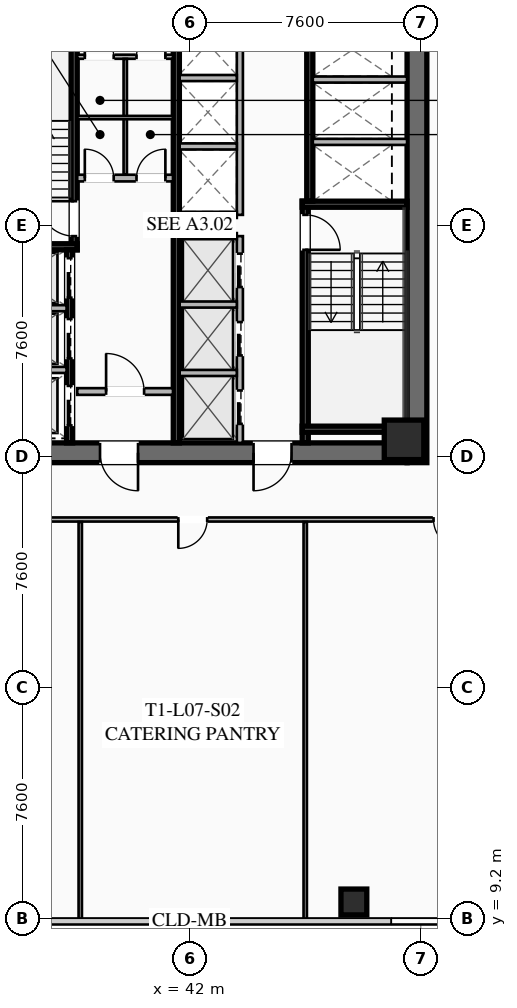
"""IFC4 building model, lengths in metres.
Left out: names, types, materials, properties, quantities, classifications, styles, units other than length and angle.
Written with IfcOpenShell. Run it as: python <this file> out.ifc"""

import sys

from ifc_helpers import new_model, si_unit, direction, frame, frame_2d, origin, origin_2d, place, context, subcontext, project, spatial, rectangle, hollow_rectangle, extrude, element, fill, save


model = new_model("IFC4")
c1 = context("Model", 3, precision=1e-05, world=origin(), true_north=direction((0.0, 1.0)))
c2 = subcontext(c1, "Body", "Model", "MODEL_VIEW")
j1 = project(units=[si_unit("LENGTHUNIT", "METRE"), si_unit("PLANEANGLEUNIT", "RADIAN")], contexts=[c1])
p1 = place(None, origin())
s1 = spatial("IfcSite", under=j1, at=p1, CompositionType="ELEMENT")
p2 = place(p1, origin())
s2 = spatial("IfcBuilding", under=s1, at=p2, CompositionType="ELEMENT")
p3 = place(p2, frame((0.0, 0.0, 31.7)))
s3 = spatial("IfcBuildingStorey", under=s2, at=p3, CompositionType="ELEMENT", Elevation=31.7)
p4 = place(p3, frame((49.475, 39.8, 0.0), z_axis=(0.0, 0.0, 1.0), x_axis=(0.0, -1.0, 0.0)))
e1 = element("IfcWall", 1, at=p4, inside=s3, PredefinedType="SHEAR", context=c2, shape_type="SweptSolid", body=[
    extrude(rectangle(XDim=15.6, YDim=0.65, at=frame_2d((7.8, 0.0))), origin(), (0.0, 0.0, 1.0), 3.55),
])
p5 = place(p3, frame((49.15, 24.525, 0.0), z_axis=(0.0, 0.0, 1.0), x_axis=(-1.0, 0.0, 0.0)))
e2 = element("IfcWall", 2, at=p5, inside=s3, PredefinedType="SHEAR", context=c2, shape_type="SweptSolid", body=[
    extrude(rectangle(XDim=14.3, YDim=0.65, at=frame_2d((7.15, 0.0))), origin(), (0.0, 0.0, 1.0), 3.55),
])
p6 = place(p5, frame((8.85, 0.0, 0.0)))
e3 = element("IfcOpeningElement", 3, at=p6, cuts=e2, PredefinedType="OPENING", context=c2, shape_type="SweptSolid", body=[
    extrude(rectangle(XDim=1.25, YDim=2.25, at=frame_2d((0.625, 1.125))), frame((0.0, 0.335, 0.0), z_axis=(0.0, -1.0, 0.0), x_axis=(1.0, 0.0, 0.0)), (0.0, 0.0, 1.0), 0.67),
])
p7 = place(p5, frame((3.8, 0.0, 0.0)))
e4 = element("IfcOpeningElement", 4, at=p7, cuts=e2, PredefinedType="OPENING", context=c2, shape_type="SweptSolid", body=[
    extrude(rectangle(XDim=1.25, YDim=2.25, at=frame_2d((0.625, 1.125))), frame((0.0, 0.335, 0.0), z_axis=(0.0, -1.0, 0.0), x_axis=(1.0, 0.0, 0.0)), (0.0, 0.0, 1.0), 0.67),
])
p8 = place(p3, frame((49.05, 24.95, 0.0), z_axis=(0.0, 0.0, 1.0), x_axis=(1.0, 0.0, 0.0)))
e5 = element("IfcColumn", 5, at=p8, inside=s3, PredefinedType="COLUMN", context=c2, shape_type="SweptSolid", body=[
    extrude(hollow_rectangle(XDim=1.3, YDim=1.3, WallThickness=0.05, at=origin_2d()), origin(), (0.0, 0.0, 1.0), 3.35),
])
p9 = place(p3, frame((47.4, 9.75, 0.0), z_axis=(0.0, 0.0, 1.0), x_axis=(1.0, 0.0, 0.0)))
e6 = element("IfcColumn", 6, at=p9, inside=s3, PredefinedType="COLUMN", context=c2, shape_type="SweptSolid", body=[
    extrude(hollow_rectangle(XDim=0.85, YDim=0.85, WallThickness=0.035, at=origin_2d()), origin(), (0.0, 0.0, 1.0), 3.35),
])
p10 = place(p3, frame((38.2, 31.2, 0.0), z_axis=(0.0, 0.0, 1.0), x_axis=(0.0, 1.0, 0.0)))
e7 = element("IfcWall", 7, at=p10, inside=s3, PredefinedType="SHEAR", context=c2, shape_type="SweptSolid", body=[
    extrude(rectangle(XDim=7.95, YDim=0.2, at=frame_2d((3.975, 0.0))), origin(), (0.0, 0.0, 1.0), 3.35),
])
p11 = place(p10, frame((0.45, 0.0, 0.0)))
e8 = element("IfcOpeningElement", 8, at=p11, cuts=e7, PredefinedType="OPENING", context=c2, shape_type="SweptSolid", body=[
    extrude(rectangle(XDim=1.15, YDim=2.2, at=frame_2d((0.575, 1.1))), frame((0.0, 0.11, 0.0), z_axis=(0.0, -1.0, 0.0), x_axis=(1.0, 0.0, 0.0)), (0.0, 0.0, 1.0), 0.22),
])
p12 = place(p3, frame((34.85, 31.3, 0.0), z_axis=(0.0, 0.0, 1.0), x_axis=(1.0, 0.0, 0.0)))
e9 = element("IfcWall", 9, at=p12, inside=s3, PredefinedType="SHEAR", context=c2, shape_type="SweptSolid", body=[
    extrude(rectangle(XDim=3.45, YDim=0.2, at=frame_2d((1.725, 0.0))), origin(), (0.0, 0.0, 1.0), 3.35),
])
p13 = place(p3, frame((45.8, 32.8, 0.0), z_axis=(0.0, 0.0, 1.0), x_axis=(0.0, -1.0, 0.0)))
e10 = element("IfcWall", 10, at=p13, inside=s3, PredefinedType="SHEAR", context=c2, shape_type="SweptSolid", body=[
    extrude(rectangle(XDim=7.95, YDim=0.2, at=frame_2d((3.975, 0.0))), origin(), (0.0, 0.0, 1.0), 3.35),
])
p14 = place(p13, frame((0.45, 0.0, 0.0)))
e11 = element("IfcOpeningElement", 11, at=p14, cuts=e10, PredefinedType="OPENING", context=c2, shape_type="SweptSolid", body=[
    extrude(rectangle(XDim=1.15, YDim=2.2, at=frame_2d((0.575, 1.1))), frame((0.0, 0.11, 0.0), z_axis=(0.0, -1.0, 0.0), x_axis=(1.0, 0.0, 0.0)), (0.0, 0.0, 1.0), 0.22),
])
for number, where, z_axis, x_axis in (
    (12, (45.7, 32.7, 0.0), (0.0, 0.0, 1.0), (1.0, 0.0, 0.0)),
    (13, (45.7, 25.3, 0.0), (0.0, 0.0, 1.0), (1.0, 0.0, 0.0)),
):
    element("IfcWall", number, at=place(p3, frame(where, z_axis=z_axis, x_axis=x_axis)), inside=s3, PredefinedType="SHEAR", context=c2, shape_type="SweptSolid", body=[
        extrude(rectangle(XDim=3.45, YDim=0.2, at=frame_2d((1.725, 0.0))), origin(), (0.0, 0.0, 1.0), 3.35),
    ])
p15 = place(p3, frame((41.56, 24.85, 0.0), z_axis=(0.0, 0.0, 1.0), x_axis=(0.0, 1.0, 0.0)))
e14 = element("IfcWall", 14, at=p15, inside=s3, PredefinedType="SHEAR", context=c2, shape_type="SweptSolid", body=[
    extrude(rectangle(XDim=14.3, YDim=0.2, at=frame_2d((7.15, 0.0))), origin(), (0.0, 0.0, 1.0), 3.35),
])
p16 = place(p3, frame((38.3, 33.56, 0.0), z_axis=(0.0, 0.0, 1.0), x_axis=(1.0, 0.0, 0.0)))
e15 = element("IfcWall", 15, at=p16, inside=s3, PredefinedType="SOLIDWALL", context=c2, shape_type="SweptSolid", body=[
    extrude(rectangle(XDim=3.15, YDim=0.22, at=frame_2d((1.575, 0.0))), origin(), (0.0, 0.0, 1.0), 2.703),
])
p17 = place(p16, frame((0.25, 0.0, 0.0)))
e16 = element("IfcOpeningElement", 16, at=p17, cuts=e15, PredefinedType="OPENING", context=c2, shape_type="SweptSolid", body=[
    extrude(rectangle(XDim=0.95, YDim=2.05, at=frame_2d((0.475, 1.025))), frame((0.0, 0.12, 0.0), z_axis=(0.0, -1.0, 0.0), x_axis=(1.0, 0.0, 0.0)), (0.0, 0.0, 1.0), 0.24),
])
p18 = place(p16, frame((1.95, 0.0, 0.0)))
e17 = element("IfcOpeningElement", 17, at=p18, cuts=e15, PredefinedType="OPENING", context=c2, shape_type="SweptSolid", body=[
    extrude(rectangle(XDim=0.95, YDim=2.05, at=frame_2d((0.475, 1.025))), frame((0.0, 0.12, 0.0), z_axis=(0.0, -1.0, 0.0), x_axis=(1.0, 0.0, 0.0)), (0.0, 0.0, 1.0), 0.24),
])
p19 = place(p3, frame((38.3, 26.54, 0.0), z_axis=(0.0, 0.0, 1.0), x_axis=(1.0, 0.0, 0.0)))
e18 = element("IfcWall", 18, at=p19, inside=s3, PredefinedType="SOLIDWALL", context=c2, shape_type="SweptSolid", body=[
    extrude(rectangle(XDim=3.15, YDim=0.22, at=frame_2d((1.575, 0.0))), origin(), (0.0, 0.0, 1.0), 2.703),
])
p20 = place(p19, frame((0.95, 0.0, 0.0)))
e19 = element("IfcOpeningElement", 19, at=p20, cuts=e18, PredefinedType="OPENING", context=c2, shape_type="SweptSolid", body=[
    extrude(rectangle(XDim=1.25, YDim=2.25, at=frame_2d((0.625, 1.125))), frame((0.0, 0.12, 0.0), z_axis=(0.0, -1.0, 0.0), x_axis=(1.0, 0.0, 0.0)), (0.0, 0.0, 1.0), 0.24),
])
p21 = place(p3, frame((38.05, 24.85, 0.0), z_axis=(0.0, 0.0, 1.0), x_axis=(0.0, 1.0, 0.0)))
e20 = element("IfcWall", 20, at=p21, inside=s3, PredefinedType="SHEAR", context=c2, shape_type="SweptSolid", body=[
    extrude(rectangle(XDim=6.35, YDim=0.2, at=frame_2d((3.175, 0.0))), origin(), (0.0, 0.0, 1.0), 3.35),
])
p22 = place(p21, frame((4.775, 0.0, 0.0)))
e21 = element("IfcOpeningElement", 21, at=p22, cuts=e20, PredefinedType="OPENING", context=c2, shape_type="SweptSolid", body=[
    extrude(rectangle(XDim=1.3, YDim=2.25, at=frame_2d((0.65, 1.125))), frame((0.0, 0.11, 0.0), z_axis=(0.0, -1.0, 0.0), x_axis=(1.0, 0.0, 0.0)), (0.0, 0.0, 1.0), 0.22),
])
p23 = place(p21, frame((2.775, 0.0, 0.0)))
e22 = element("IfcOpeningElement", 22, at=p23, cuts=e20, PredefinedType="OPENING", context=c2, shape_type="SweptSolid", body=[
    extrude(rectangle(XDim=1.3, YDim=2.25, at=frame_2d((0.65, 1.125))), frame((0.0, 0.11, 0.0), z_axis=(0.0, -1.0, 0.0), x_axis=(1.0, 0.0, 0.0)), (0.0, 0.0, 1.0), 0.22),
])
p24 = place(p21, frame((0.575, 0.0, 0.0)))
e23 = element("IfcOpeningElement", 23, at=p24, cuts=e20, PredefinedType="OPENING", context=c2, shape_type="SweptSolid", body=[
    extrude(rectangle(XDim=1.3, YDim=2.25, at=frame_2d((0.65, 1.125))), frame((0.0, 0.11, 0.0), z_axis=(0.0, -1.0, 0.0), x_axis=(1.0, 0.0, 0.0)), (0.0, 0.0, 1.0), 0.22),
])
for number, where, z_axis, x_axis in (
    (24, (34.85, 27.25, 0.0), (0.0, 0.0, 1.0), (1.0, 0.0, 0.0)),
    (25, (34.85, 29.28, 0.0), (0.0, 0.0, 1.0), (1.0, 0.0, 0.0)),
):
    element("IfcWall", number, at=place(p3, frame(where, z_axis=z_axis, x_axis=x_axis)), inside=s3, PredefinedType="SOLIDWALL", context=c2, shape_type="SweptSolid", body=[
        extrude(rectangle(XDim=3.1, YDim=0.2, at=frame_2d((1.55, 0.0))), origin(), (0.0, 0.0, 1.0), 3.35),
    ])
p25 = place(p3, frame((45.95, 39.15, 0.0), z_axis=(0.0, 0.0, 1.0), x_axis=(0.0, -1.0, 0.0)))
e26 = element("IfcWall", 26, at=p25, inside=s3, PredefinedType="SHEAR", context=c2, shape_type="SweptSolid", body=[
    extrude(rectangle(XDim=6.35, YDim=0.2, at=frame_2d((3.175, 0.0))), origin(), (0.0, 0.0, 1.0), 3.35),
])
for number, where, z_axis, x_axis in (
    (27, (46.05, 34.75, 0.0), (0.0, 0.0, 1.0), (1.0, 0.0, 0.0)),
    (28, (46.05, 36.8, 0.0), (0.0, 0.0, 1.0), (1.0, 0.0, 0.0)),
):
    element("IfcWall", number, at=place(p3, frame(where, z_axis=z_axis, x_axis=x_axis)), inside=s3, PredefinedType="SOLIDWALL", context=c2, shape_type="SweptSolid", body=[
        extrude(rectangle(XDim=3.1, YDim=0.2, at=frame_2d((1.55, 0.0))), origin(), (0.0, 0.0, 1.0), 3.35),
    ])
p26 = place(p3, frame((38.3, 37.55, 0.0), z_axis=(0.0, 0.0, 1.0), x_axis=(1.0, 0.0, 0.0)))
e29 = element("IfcWall", 29, at=p26, inside=s3, PredefinedType="PARTITIONING", context=c2, shape_type="SweptSolid", body=[
    extrude(rectangle(XDim=3.15, YDim=0.135, at=frame_2d((1.575, 0.0))), origin(), (0.0, 0.0, 1.0), 2.703),
])
p27 = place(p26, frame((0.25, 0.0, 0.0)))
e30 = element("IfcOpeningElement", 30, at=p27, cuts=e29, PredefinedType="OPENING", context=c2, shape_type="SweptSolid", body=[
    extrude(rectangle(XDim=0.95, YDim=2.05, at=frame_2d((0.475, 1.025))), frame((0.0, 0.077, 0.0), z_axis=(0.0, -1.0, 0.0), x_axis=(1.0, 0.0, 0.0)), (0.0, 0.0, 1.0), 0.155),
])
p28 = place(p26, frame((1.95, 0.0, 0.0)))
e31 = element("IfcOpeningElement", 31, at=p28, cuts=e29, PredefinedType="OPENING", context=c2, shape_type="SweptSolid", body=[
    extrude(rectangle(XDim=0.95, YDim=2.05, at=frame_2d((0.475, 1.025))), frame((0.0, 0.077, 0.0), z_axis=(0.0, -1.0, 0.0), x_axis=(1.0, 0.0, 0.0)), (0.0, 0.0, 1.0), 0.155),
])
p29 = place(p3, frame((39.88, 33.68, 0.0), z_axis=(0.0, 0.0, 1.0), x_axis=(0.0, 1.0, 0.0)))
e32 = element("IfcWall", 32, at=p29, inside=s3, PredefinedType="PARTITIONING", context=c2, shape_type="SweptSolid", body=[
    extrude(rectangle(XDim=3.8, YDim=0.11, at=frame_2d((1.9, 0.0))), origin(), (0.0, 0.0, 1.0), 2.703),
])
p30 = place(p3, frame((38.3, 35.55, 0.0), z_axis=(0.0, 0.0, 1.0), x_axis=(1.0, 0.0, 0.0)))
e33 = element("IfcWall", 33, at=p30, inside=s3, PredefinedType="PARTITIONING", context=c2, shape_type="SweptSolid", body=[
    extrude(rectangle(XDim=3.15, YDim=0.11, at=frame_2d((1.575, 0.0))), origin(), (0.0, 0.0, 1.0), 2.703),
])
p31 = place(p3, frame((43.65, 24.85, 0.0), z_axis=(0.0, 0.0, 1.0), x_axis=(0.0, 1.0, 0.0)))
e34 = element("IfcWall", 34, at=p31, inside=s3, PredefinedType="SOLIDWALL", context=c2, shape_type="SweptSolid", body=[
    extrude(rectangle(XDim=6.8, YDim=0.2, at=frame_2d((3.4, 0.0))), origin(), (0.0, 0.0, 1.0), 3.35),
])
p32 = place(p31, frame((0.625, 0.0, 0.0)))
e35 = element("IfcOpeningElement", 35, at=p32, cuts=e34, PredefinedType="OPENING", context=c2, shape_type="SweptSolid", body=[
    extrude(rectangle(XDim=1.1, YDim=2.2, at=frame_2d((0.55, 1.1))), frame((0.0, 0.11, 0.0), z_axis=(0.0, -1.0, 0.0), x_axis=(1.0, 0.0, 0.0)), (0.0, 0.0, 1.0), 0.22),
])
p33 = place(p31, frame((2.875, 0.0, 0.0)))
e36 = element("IfcOpeningElement", 36, at=p33, cuts=e34, PredefinedType="OPENING", context=c2, shape_type="SweptSolid", body=[
    extrude(rectangle(XDim=1.1, YDim=2.2, at=frame_2d((0.55, 1.1))), frame((0.0, 0.11, 0.0), z_axis=(0.0, -1.0, 0.0), x_axis=(1.0, 0.0, 0.0)), (0.0, 0.0, 1.0), 0.22),
])
p34 = place(p31, frame((5.125, 0.0, 0.0)))
e37 = element("IfcOpeningElement", 37, at=p34, cuts=e34, PredefinedType="OPENING", context=c2, shape_type="SweptSolid", body=[
    extrude(rectangle(XDim=1.1, YDim=2.2, at=frame_2d((0.55, 1.1))), frame((0.0, 0.11, 0.0), z_axis=(0.0, -1.0, 0.0), x_axis=(1.0, 0.0, 0.0)), (0.0, 0.0, 1.0), 0.22),
])
for number, where, z_axis, x_axis in (
    (38, (41.67, 27.15, 0.0), (0.0, 0.0, 1.0), (1.0, 0.0, 0.0)),
    (39, (41.67, 29.4, 0.0), (0.0, 0.0, 1.0), (1.0, 0.0, 0.0)),
    (40, (41.67, 31.65, 0.0), (0.0, 0.0, 1.0), (1.0, 0.0, 0.0)),
):
    element("IfcWall", number, at=place(p3, frame(where, z_axis=z_axis, x_axis=x_axis)), inside=s3, PredefinedType="SOLIDWALL", context=c2, shape_type="SweptSolid", body=[
        extrude(rectangle(XDim=1.88, YDim=0.2, at=frame_2d((0.94, 0.0))), origin(), (0.0, 0.0, 1.0), 3.35),
    ])
p35 = place(p3, frame((43.65, 32.35, 0.0), z_axis=(0.0, 0.0, 1.0), x_axis=(0.0, 1.0, 0.0)))
e41 = element("IfcWall", 41, at=p35, inside=s3, PredefinedType="SOLIDWALL", context=c2, shape_type="SweptSolid", body=[
    extrude(rectangle(XDim=6.8, YDim=0.2, at=frame_2d((3.4, 0.0))), origin(), (0.0, 0.0, 1.0), 3.35),
])
for number, where, z_axis, x_axis in (
    (42, (41.67, 32.35, 0.0), (0.0, 0.0, 1.0), (1.0, 0.0, 0.0)),
    (43, (41.67, 34.6, 0.0), (0.0, 0.0, 1.0), (1.0, 0.0, 0.0)),
    (44, (41.67, 36.85, 0.0), (0.0, 0.0, 1.0), (1.0, 0.0, 0.0)),
):
    element("IfcWall", number, at=place(p3, frame(where, z_axis=z_axis, x_axis=x_axis)), inside=s3, PredefinedType="SOLIDWALL", context=c2, shape_type="SweptSolid", body=[
        extrude(rectangle(XDim=1.88, YDim=0.2, at=frame_2d((0.94, 0.0))), origin(), (0.0, 0.0, 1.0), 3.35),
    ])
p36 = place(p3, frame((51.35, 22.33, 0.0), z_axis=(0.0, 0.0, 1.0), x_axis=(-1.0, 0.0, 0.0)))
e45 = element("IfcWall", 45, at=p36, inside=s3, PredefinedType="PARTITIONING", context=c2, shape_type="SweptSolid", body=[
    extrude(rectangle(XDim=29.0, YDim=0.135, at=frame_2d((14.5, 0.0))), origin(), (0.0, 0.0, 1.0), 2.703),
])
p37 = place(p36, frame((27.67, 0.0, 0.0)))
e46 = element("IfcOpeningElement", 46, at=p37, cuts=e45, PredefinedType="OPENING", context=c2, shape_type="SweptSolid", body=[
    extrude(rectangle(XDim=0.95, YDim=2.05, at=frame_2d((0.475, 1.025))), frame((0.0, 0.077, 0.0), z_axis=(0.0, -1.0, 0.0), x_axis=(1.0, 0.0, 0.0)), (0.0, 0.0, 1.0), 0.155),
])
p38 = place(p36, frame((8.775, 0.0, 0.0)))
e47 = element("IfcOpeningElement", 47, at=p38, cuts=e45, PredefinedType="OPENING", context=c2, shape_type="SweptSolid", body=[
    extrude(rectangle(XDim=0.95, YDim=2.05, at=frame_2d((0.475, 1.025))), frame((0.0, 0.077, 0.0), z_axis=(0.0, -1.0, 0.0), x_axis=(1.0, 0.0, 0.0)), (0.0, 0.0, 1.0), 0.155),
])
p39 = place(p36, frame((0.38, 0.0, 0.0)))
e48 = element("IfcOpeningElement", 48, at=p39, cuts=e45, PredefinedType="OPENING", context=c2, shape_type="SweptSolid", body=[
    extrude(rectangle(XDim=0.95, YDim=2.05, at=frame_2d((0.475, 1.025))), frame((0.0, 0.077, 0.0), z_axis=(0.0, -1.0, 0.0), x_axis=(1.0, 0.0, 0.0)), (0.0, 0.0, 1.0), 0.155),
])
for number, where, z_axis, x_axis in (
    (49, (38.4, 9.12, 0.0), (0.0, 0.0, 1.0), (0.0, 1.0, 0.0)),
    (50, (45.8, 9.12, 0.0), (0.0, 0.0, 1.0), (0.0, 1.0, 0.0)),
):
    element("IfcWall", number, at=place(p3, frame(where, z_axis=z_axis, x_axis=x_axis)), inside=s3, PredefinedType="PARTITIONING", context=c2, shape_type="SweptSolid", body=[
        extrude(rectangle(XDim=13.13, YDim=0.11, at=frame_2d((6.565, 0.0))), origin(), (0.0, 0.0, 1.0), 2.703),
    ])
p40 = place(p6, origin())
e51 = element("IfcDoor", 51, at=p40, inside=s3, OperationType="SINGLE_SWING_LEFT", PredefinedType="DOOR", context=c2, shape_type="SweptSolid", body=[
    extrude(rectangle(XDim=1.25, YDim=2.25, at=frame_2d((0.625, 1.125))), frame((0.0, 0.025, 0.0), z_axis=(0.0, -1.0, 0.0), x_axis=(1.0, 0.0, 0.0)), (0.0, 0.0, 1.0), 0.05),
])
fill(e3, e51)
p41 = place(p7, origin())
e52 = element("IfcDoor", 52, at=p41, inside=s3, OperationType="SINGLE_SWING_RIGHT", PredefinedType="DOOR", context=c2, shape_type="SweptSolid", body=[
    extrude(rectangle(XDim=1.25, YDim=2.25, at=frame_2d((0.625, 1.125))), frame((0.0, 0.025, 0.0), z_axis=(0.0, -1.0, 0.0), x_axis=(1.0, 0.0, 0.0)), (0.0, 0.0, 1.0), 0.05),
])
fill(e4, e52)
p42 = place(p11, origin())
e53 = element("IfcDoor", 53, at=p42, inside=s3, OperationType="SINGLE_SWING_RIGHT", PredefinedType="DOOR", context=c2, shape_type="SweptSolid", body=[
    extrude(rectangle(XDim=1.15, YDim=2.2, at=frame_2d((0.575, 1.1))), frame((0.0, 0.025, 0.0), z_axis=(0.0, -1.0, 0.0), x_axis=(1.0, 0.0, 0.0)), (0.0, 0.0, 1.0), 0.05),
])
fill(e8, e53)
p43 = place(p14, origin())
e54 = element("IfcDoor", 54, at=p43, inside=s3, OperationType="SINGLE_SWING_RIGHT", PredefinedType="DOOR", context=c2, shape_type="SweptSolid", body=[
    extrude(rectangle(XDim=1.15, YDim=2.2, at=frame_2d((0.575, 1.1))), frame((0.0, 0.025, 0.0), z_axis=(0.0, -1.0, 0.0), x_axis=(1.0, 0.0, 0.0)), (0.0, 0.0, 1.0), 0.05),
])
fill(e11, e54)
p44 = place(p20, origin())
e55 = element("IfcDoor", 55, at=p44, inside=s3, OperationType="SINGLE_SWING_LEFT", PredefinedType="DOOR", context=c2, shape_type="SweptSolid", body=[
    extrude(rectangle(XDim=1.25, YDim=2.25, at=frame_2d((0.625, 1.125))), frame((0.0, 0.025, 0.0), z_axis=(0.0, -1.0, 0.0), x_axis=(1.0, 0.0, 0.0)), (0.0, 0.0, 1.0), 0.05),
])
fill(e19, e55)
p45 = place(p27, origin())
e56 = element("IfcDoor", 56, at=p45, inside=s3, OperationType="SINGLE_SWING_LEFT", PredefinedType="DOOR", context=c2, shape_type="SweptSolid", body=[
    extrude(rectangle(XDim=0.95, YDim=2.05, at=frame_2d((0.475, 1.025))), frame((0.0, 0.025, 0.0), z_axis=(0.0, -1.0, 0.0), x_axis=(1.0, 0.0, 0.0)), (0.0, 0.0, 1.0), 0.05),
])
fill(e30, e56)
p46 = place(p28, origin())
e57 = element("IfcDoor", 57, at=p46, inside=s3, OperationType="SINGLE_SWING_RIGHT", PredefinedType="DOOR", context=c2, shape_type="SweptSolid", body=[
    extrude(rectangle(XDim=0.95, YDim=2.05, at=frame_2d((0.475, 1.025))), frame((0.0, 0.025, 0.0), z_axis=(0.0, -1.0, 0.0), x_axis=(1.0, 0.0, 0.0)), (0.0, 0.0, 1.0), 0.05),
])
fill(e31, e57)
p47 = place(p17, origin())
e58 = element("IfcDoor", 58, at=p47, inside=s3, OperationType="SINGLE_SWING_LEFT", PredefinedType="DOOR", context=c2, shape_type="SweptSolid", body=[
    extrude(rectangle(XDim=0.95, YDim=2.05, at=frame_2d((0.475, 1.025))), frame((0.0, 0.025, 0.0), z_axis=(0.0, -1.0, 0.0), x_axis=(1.0, 0.0, 0.0)), (0.0, 0.0, 1.0), 0.05),
])
fill(e16, e58)
p48 = place(p18, origin())
e59 = element("IfcDoor", 59, at=p48, inside=s3, OperationType="SINGLE_SWING_RIGHT", PredefinedType="DOOR", context=c2, shape_type="SweptSolid", body=[
    extrude(rectangle(XDim=0.95, YDim=2.05, at=frame_2d((0.475, 1.025))), frame((0.0, 0.025, 0.0), z_axis=(0.0, -1.0, 0.0), x_axis=(1.0, 0.0, 0.0)), (0.0, 0.0, 1.0), 0.05),
])
fill(e17, e59)
p49 = place(p38, origin())
e60 = element("IfcDoor", 60, at=p49, inside=s3, OperationType="SINGLE_SWING_RIGHT", PredefinedType="DOOR", context=c2, shape_type="SweptSolid", body=[
    extrude(rectangle(XDim=0.95, YDim=2.05, at=frame_2d((0.475, 1.025))), frame((0.0, 0.025, 0.0), z_axis=(0.0, -1.0, 0.0), x_axis=(1.0, 0.0, 0.0)), (0.0, 0.0, 1.0), 0.05),
])
fill(e47, e60)
p50 = place(p39, origin())
e61 = element("IfcDoor", 61, at=p50, inside=s3, OperationType="SINGLE_SWING_LEFT", PredefinedType="DOOR", context=c2, shape_type="SweptSolid", body=[
    extrude(rectangle(XDim=0.95, YDim=2.05, at=frame_2d((0.475, 1.025))), frame((0.0, 0.025, 0.0), z_axis=(0.0, -1.0, 0.0), x_axis=(1.0, 0.0, 0.0)), (0.0, 0.0, 1.0), 0.05),
])
fill(e48, e61)
p51 = place(p22, origin())
e62 = element("IfcDoor", 62, at=p51, inside=s3, OperationType="SLIDING_TO_LEFT", PredefinedType="DOOR", context=c2, shape_type="SweptSolid", body=[
    extrude(rectangle(XDim=1.3, YDim=2.25, at=frame_2d((0.65, 1.125))), frame((0.0, 0.025, 0.0), z_axis=(0.0, -1.0, 0.0), x_axis=(1.0, 0.0, 0.0)), (0.0, 0.0, 1.0), 0.05),
])
fill(e21, e62)
p52 = place(p23, origin())
e63 = element("IfcDoor", 63, at=p52, inside=s3, OperationType="SLIDING_TO_LEFT", PredefinedType="DOOR", context=c2, shape_type="SweptSolid", body=[
    extrude(rectangle(XDim=1.3, YDim=2.25, at=frame_2d((0.65, 1.125))), frame((0.0, 0.025, 0.0), z_axis=(0.0, -1.0, 0.0), x_axis=(1.0, 0.0, 0.0)), (0.0, 0.0, 1.0), 0.05),
])
fill(e22, e63)
p53 = place(p24, origin())
e64 = element("IfcDoor", 64, at=p53, inside=s3, OperationType="SLIDING_TO_LEFT", PredefinedType="DOOR", context=c2, shape_type="SweptSolid", body=[
    extrude(rectangle(XDim=1.3, YDim=2.25, at=frame_2d((0.65, 1.125))), frame((0.0, 0.025, 0.0), z_axis=(0.0, -1.0, 0.0), x_axis=(1.0, 0.0, 0.0)), (0.0, 0.0, 1.0), 0.05),
])
fill(e23, e64)
p54 = place(p32, origin())
e65 = element("IfcDoor", 65, at=p54, inside=s3, OperationType="SLIDING_TO_LEFT", PredefinedType="DOOR", context=c2, shape_type="SweptSolid", body=[
    extrude(rectangle(XDim=1.1, YDim=2.2, at=frame_2d((0.55, 1.1))), frame((0.0, 0.025, 0.0), z_axis=(0.0, -1.0, 0.0), x_axis=(1.0, 0.0, 0.0)), (0.0, 0.0, 1.0), 0.05),
])
fill(e35, e65)
p55 = place(p33, origin())
e66 = element("IfcDoor", 66, at=p55, inside=s3, OperationType="SLIDING_TO_LEFT", PredefinedType="DOOR", context=c2, shape_type="SweptSolid", body=[
    extrude(rectangle(XDim=1.1, YDim=2.2, at=frame_2d((0.55, 1.1))), frame((0.0, 0.025, 0.0), z_axis=(0.0, -1.0, 0.0), x_axis=(1.0, 0.0, 0.0)), (0.0, 0.0, 1.0), 0.05),
])
fill(e36, e66)
p56 = place(p34, origin())
e67 = element("IfcDoor", 67, at=p56, inside=s3, OperationType="SLIDING_TO_LEFT", PredefinedType="DOOR", context=c2, shape_type="SweptSolid", body=[
    extrude(rectangle(XDim=1.1, YDim=2.2, at=frame_2d((0.55, 1.1))), frame((0.0, 0.025, 0.0), z_axis=(0.0, -1.0, 0.0), x_axis=(1.0, 0.0, 0.0)), (0.0, 0.0, 1.0), 0.05),
])
fill(e37, e67)
save(model, sys.argv[1])
